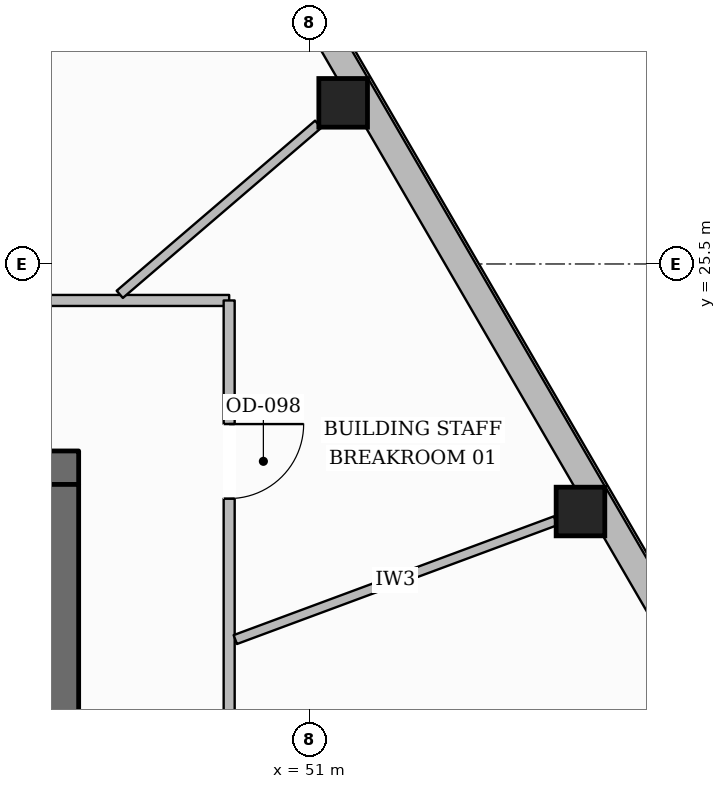
"""IFC4 building model, lengths in metres.
Left out: names, types, materials, properties, quantities, classifications, styles, units other than length and angle.
Written with IfcOpenShell. Run it as: python <this file> out.ifc"""

import sys

from ifc_helpers import new_model, si_unit, direction, frame, frame_2d, origin, origin_2d, place, context, subcontext, project, spatial, rectangle, hollow_rectangle, extrude, element, fill, save


model = new_model("IFC4")
c1 = context("Model", 3, precision=1e-05, world=origin(), true_north=direction((0.0, 1.0)))
c2 = subcontext(c1, "Body", "Model", "MODEL_VIEW")
j1 = project(units=[si_unit("LENGTHUNIT", "METRE"), si_unit("PLANEANGLEUNIT", "RADIAN")], contexts=[c1])
p1 = place(None, origin())
s1 = spatial("IfcSite", under=j1, at=p1, CompositionType="ELEMENT")
p2 = place(p1, origin())
s2 = spatial("IfcBuilding", under=s1, at=p2, CompositionType="ELEMENT")
p3 = place(p2, frame((0.0, 0.0, 211.2)))
s3 = spatial("IfcBuildingStorey", under=s2, at=p3, CompositionType="ELEMENT", Elevation=211.2)
p4 = place(p3, frame((28.04, 22.82, 0.0), z_axis=(0.0, 0.0, 1.0), x_axis=(1.0, 0.0, 0.0)))
e1 = element("IfcWall", 1, at=p4, inside=s3, PredefinedType="SOLIDWALL", context=c2, shape_type="SweptSolid", body=[
    extrude(rectangle(XDim=19.92, YDim=0.44, at=frame_2d((9.96, 0.0))), origin(), (0.0, 0.0, 1.0), 3.6),
])
p5 = place(p4, frame((6.235, 0.0, 0.0)))
e2 = element("IfcOpeningElement", 2, at=p5, cuts=e1, PredefinedType="OPENING", context=c2, shape_type="SweptSolid", body=[
    extrude(rectangle(XDim=1.05, YDim=2.15, at=frame_2d((0.525, 1.075))), frame((0.0, 0.23, 0.0), z_axis=(0.0, -1.0, 0.0), x_axis=(1.0, 0.0, 0.0)), (0.0, 0.0, 1.0), 0.46),
])
p6 = place(p4, frame((12.635, 0.0, 0.0)))
e3 = element("IfcOpeningElement", 3, at=p6, cuts=e1, PredefinedType="OPENING", context=c2, shape_type="SweptSolid", body=[
    extrude(rectangle(XDim=1.05, YDim=2.15, at=frame_2d((0.525, 1.075))), frame((0.0, 0.23, 0.0), z_axis=(0.0, -1.0, 0.0), x_axis=(1.0, 0.0, 0.0)), (0.0, 0.0, 1.0), 0.46),
])
p7 = place(p3, frame((47.74, 9.6, 0.0), z_axis=(0.0, 0.0, 1.0), x_axis=(0.0, 1.0, 0.0)))
e4 = element("IfcWall", 4, at=p7, inside=s3, PredefinedType="SOLIDWALL", context=c2, shape_type="SweptSolid", body=[
    extrude(rectangle(XDim=13.0, YDim=0.44, at=frame_2d((6.5, 0.0))), origin(), (0.0, 0.0, 1.0), 3.6),
])
p8 = place(p7, frame((0.2, 0.0, 0.0)))
e5 = element("IfcOpeningElement", 5, at=p8, cuts=e4, PredefinedType="OPENING", context=c2, shape_type="SweptSolid", body=[
    extrude(rectangle(XDim=1.1, YDim=2.15, at=frame_2d((0.55, 1.075))), frame((0.0, 0.23, 0.0), z_axis=(0.0, -1.0, 0.0), x_axis=(1.0, 0.0, 0.0)), (0.0, 0.0, 1.0), 0.46),
])
p9 = place(p7, frame((8.4, 0.0, 0.0)))
e6 = element("IfcOpeningElement", 6, at=p9, cuts=e4, PredefinedType="OPENING", context=c2, shape_type="SweptSolid", body=[
    extrude(rectangle(XDim=0.9, YDim=2.1, at=frame_2d((0.45, 1.05))), frame((0.0, 0.23, 0.0), z_axis=(0.0, -1.0, 0.0), x_axis=(1.0, 0.0, 0.0)), (0.0, 0.0, 1.0), 0.46),
])
for number, where, z_axis, x_axis in (
    (7, (54.562, 22.243, 0.0), (0.0, 0.0, 1.0), (1.0, 0.0, 0.0)),
    (8, (51.44, 27.62, 0.0), (0.0, 0.0, 1.0), (1.0, 0.0, 0.0)),
):
    element("IfcColumn", number, at=place(p3, frame(where, z_axis=z_axis, x_axis=x_axis)), inside=s3, PredefinedType="COLUMN", context=c2, shape_type="SweptSolid", body=[
        extrude(hollow_rectangle(XDim=0.64, YDim=0.64, WallThickness=0.028, at=origin_2d()), origin(), (0.0, 0.0, 1.0), 3.6),
    ])
p10 = place(p3, frame((42.066, 44.299, 0.0), z_axis=(0.0, 0.0, 1.0), x_axis=(0.502188775534, -0.864758020331, 0.0)))
e9 = element("IfcWall", 9, at=p10, inside=s3, PredefinedType="STANDARD", context=c2, shape_type="SweptSolid", body=[
    extrude(rectangle(XDim=38.263, YDim=0.35, at=frame_2d((19.132, 0.0))), origin(), (0.0, 0.0, 1.0), 3.132),
])
p11 = place(p10, frame((33.948, 0.0, 0.65)))
e10 = element("IfcOpeningElement", 10, at=p11, cuts=e9, PredefinedType="OPENING", context=c2, shape_type="SweptSolid", body=[
    extrude(rectangle(XDim=1.45, YDim=1.75, at=frame_2d((0.725, 0.875))), frame((0.0, 0.185, 0.0), z_axis=(0.0, -1.0, 0.0), x_axis=(1.0, 0.0, 0.0)), (0.0, 0.0, 1.0), 0.37),
])
p12 = place(p10, frame((27.731, 0.0, 0.65)))
e11 = element("IfcOpeningElement", 11, at=p12, cuts=e9, PredefinedType="OPENING", context=c2, shape_type="SweptSolid", body=[
    extrude(rectangle(XDim=1.45, YDim=1.75, at=frame_2d((0.725, 0.875))), frame((0.0, 0.185, 0.0), z_axis=(0.0, -1.0, 0.0), x_axis=(1.0, 0.0, 0.0)), (0.0, 0.0, 1.0), 0.37),
])
p13 = place(p10, frame((15.297, 0.0, 0.65)))
e12 = element("IfcOpeningElement", 12, at=p13, cuts=e9, PredefinedType="OPENING", context=c2, shape_type="SweptSolid", body=[
    extrude(rectangle(XDim=1.45, YDim=1.75, at=frame_2d((0.725, 0.875))), frame((0.0, 0.185, 0.0), z_axis=(0.0, -1.0, 0.0), x_axis=(1.0, 0.0, 0.0)), (0.0, 0.0, 1.0), 0.37),
])
p14 = place(p10, frame((9.079, 0.0, 0.65)))
e13 = element("IfcOpeningElement", 13, at=p14, cuts=e9, PredefinedType="OPENING", context=c2, shape_type="SweptSolid", body=[
    extrude(rectangle(XDim=1.45, YDim=1.75, at=frame_2d((0.725, 0.875))), frame((0.0, 0.185, 0.0), z_axis=(0.0, -1.0, 0.0), x_axis=(1.0, 0.0, 0.0)), (0.0, 0.0, 1.0), 0.37),
])
p15 = place(p10, frame((2.862, 0.0, 0.65)))
e14 = element("IfcOpeningElement", 14, at=p15, cuts=e9, PredefinedType="OPENING", context=c2, shape_type="SweptSolid", body=[
    extrude(rectangle(XDim=1.45, YDim=1.75, at=frame_2d((0.725, 0.875))), frame((0.0, 0.185, 0.0), z_axis=(0.0, -1.0, 0.0), x_axis=(1.0, 0.0, 0.0)), (0.0, 0.0, 1.0), 0.37),
])
p16 = place(p3, frame((47.0, 25.02, 0.0), z_axis=(0.0, 0.0, 1.0), x_axis=(1.0, 0.0, 0.0)))
e15 = element("IfcWall", 15, at=p16, inside=s3, PredefinedType="PARTITIONING", context=c2, shape_type="SweptSolid", body=[
    extrude(rectangle(XDim=2.94, YDim=0.145, at=frame_2d((1.47, 0.0))), origin(), (0.0, 0.0, 1.0), 3.6),
])
p17 = place(p3, frame((49.94, 25.02, 0.0), z_axis=(0.0, 0.0, 1.0), x_axis=(0.0, -1.0, 0.0)))
e16 = element("IfcWall", 16, at=p17, inside=s3, PredefinedType="PARTITIONING", context=c2, shape_type="SweptSolid", body=[
    extrude(rectangle(XDim=7.92, YDim=0.145, at=frame_2d((3.96, 0.0))), origin(), (0.0, 0.0, 1.0), 3.339),
])
p18 = place(p17, frame((1.626, 0.0, 0.0)))
e17 = element("IfcOpeningElement", 17, at=p18, cuts=e16, PredefinedType="OPENING", context=c2, shape_type="SweptSolid", body=[
    extrude(rectangle(XDim=0.98, YDim=2.15, at=frame_2d((0.49, 1.075))), frame((0.0, 0.083, 0.0), z_axis=(0.0, -1.0, 0.0), x_axis=(1.0, 0.0, 0.0)), (0.0, 0.0, 1.0), 0.165),
])
p19 = place(p3, frame((50.021, 20.559, 0.0), z_axis=(0.0, 0.0, 1.0), x_axis=(0.937586789971, 0.347751364156, 0.0)))
e18 = element("IfcWall", 18, at=p19, inside=s3, PredefinedType="PARTITIONING", context=c2, shape_type="SweptSolid", body=[
    extrude(rectangle(XDim=4.494, YDim=0.125, at=frame_2d((2.247, 0.0))), origin(), (0.0, 0.0, 1.0), 3.6),
])
p20 = place(p3, frame((48.5, 25.101, 0.0), z_axis=(0.0, 0.0, 1.0), x_axis=(0.759291677872, 0.650750449799, 0.0)))
e19 = element("IfcWall", 19, at=p20, inside=s3, PredefinedType="PARTITIONING", context=c2, shape_type="SweptSolid", body=[
    extrude(rectangle(XDim=3.439, YDim=0.125, at=frame_2d((1.72, 0.0))), origin(), (0.0, 0.0, 1.0), 3.141),
])
p21 = place(p18, origin())
e20 = element("IfcDoor", 20, at=p21, inside=s3, OperationType="SINGLE_SWING_LEFT", PredefinedType="DOOR", context=c2, shape_type="SweptSolid", body=[
    extrude(rectangle(XDim=0.98, YDim=2.15, at=frame_2d((0.49, 1.075))), frame((0.0, 0.025, 0.0), z_axis=(0.0, -1.0, 0.0), x_axis=(1.0, 0.0, 0.0)), (0.0, 0.0, 1.0), 0.05),
])
fill(e17, e20)
save(model, sys.argv[1])
